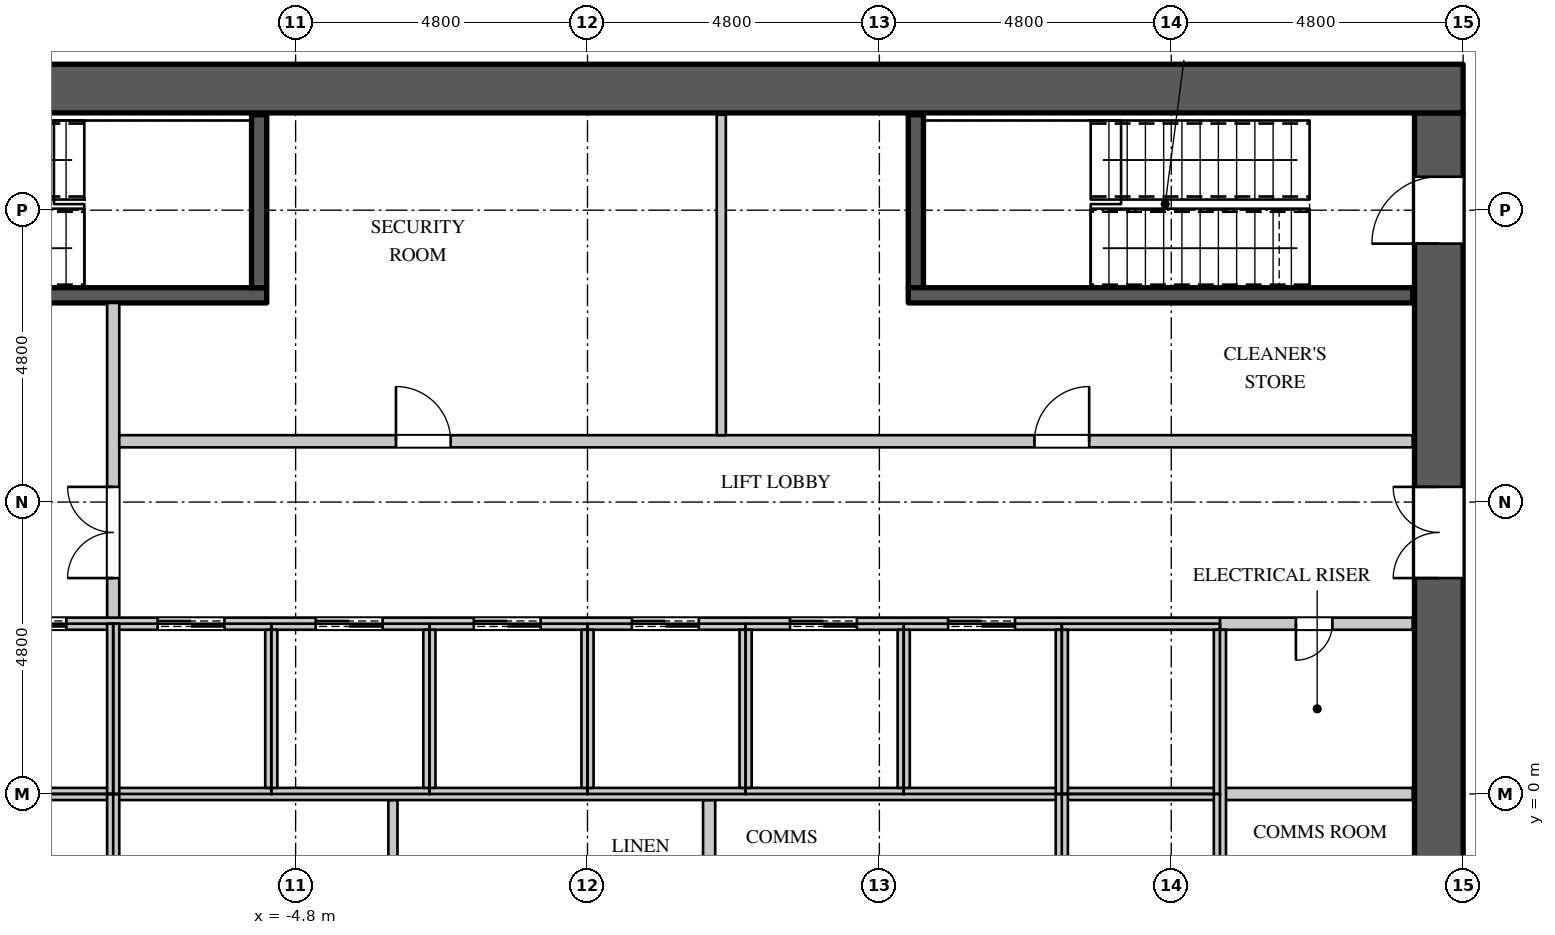
"""IFC4 building model, lengths in metres.
Left out: names, types, materials, properties, quantities, classifications, styles, units other than length and angle.
Written with IfcOpenShell. Run it as: python <this file> out.ifc"""

import sys

from ifc_helpers import new_model, si_unit, direction, frame, frame_2d, origin, place, context, subcontext, project, spatial, rectangle, extrude, element, fill, save


model = new_model("IFC4")
c1 = context("Model", 3, precision=1e-05, world=origin(), true_north=direction((0.0, 1.0)))
c2 = subcontext(c1, "Body", "Model", "MODEL_VIEW")
j1 = project(units=[si_unit("LENGTHUNIT", "METRE"), si_unit("PLANEANGLEUNIT", "RADIAN")], contexts=[c1])
p1 = place(None, origin())
s1 = spatial("IfcSite", under=j1, at=p1, CompositionType="ELEMENT")
p2 = place(p1, origin())
s2 = spatial("IfcBuilding", under=s1, at=p2, CompositionType="ELEMENT")
p3 = place(p2, frame((0.0, 0.0, 131.7)))
s3 = spatial("IfcBuildingStorey", under=s2, at=p3, CompositionType="ELEMENT", Elevation=131.7)
p4 = place(p3, frame((-14.4, 11.6, 0.0), z_axis=(0.0, 0.0, 1.0), x_axis=(1.0, 0.0, 0.0)))
e1 = element("IfcWall", 1, at=p4, inside=s3, PredefinedType="SHEAR", context=c2, shape_type="SweptSolid", body=[
    extrude(rectangle(XDim=28.8, YDim=0.8, at=frame_2d((14.4, 0.0))), origin(), (0.0, 0.0, 1.0), 4.2),
])
p5 = place(p3, frame((14.0, -11.2, 0.0), z_axis=(0.0, 0.0, 1.0), x_axis=(0.0, 1.0, 0.0)))
e2 = element("IfcWall", 2, at=p5, inside=s3, PredefinedType="SHEAR", context=c2, shape_type="SweptSolid", body=[
    extrude(rectangle(XDim=22.4, YDim=0.8, at=frame_2d((11.2, 0.0))), origin(), (0.0, 0.0, 1.0), 4.2),
])
p6 = place(p5, frame((20.25, 0.0, 0.0)))
e3 = element("IfcOpeningElement", 3, at=p6, cuts=e2, PredefinedType="OPENING", context=c2, shape_type="SweptSolid", body=[
    extrude(rectangle(XDim=1.1, YDim=2.2, at=frame_2d((0.55, 1.1))), frame((0.0, 0.41, 0.0), z_axis=(0.0, -1.0, 0.0), x_axis=(1.0, 0.0, 0.0)), (0.0, 0.0, 1.0), 0.82),
])
p7 = place(p5, frame((1.05, 0.0, 0.0)))
e4 = element("IfcOpeningElement", 4, at=p7, cuts=e2, PredefinedType="OPENING", context=c2, shape_type="SweptSolid", body=[
    extrude(rectangle(XDim=1.1, YDim=2.2, at=frame_2d((0.55, 1.1))), frame((0.0, 0.41, 0.0), z_axis=(0.0, -1.0, 0.0), x_axis=(1.0, 0.0, 0.0)), (0.0, 0.0, 1.0), 0.82),
])
p8 = place(p5, frame((14.75, 0.0, 0.0)))
e5 = element("IfcOpeningElement", 5, at=p8, cuts=e2, PredefinedType="OPENING", context=c2, shape_type="SweptSolid", body=[
    extrude(rectangle(XDim=1.5, YDim=2.4, at=frame_2d((0.75, 1.2))), frame((0.0, 0.41, 0.0), z_axis=(0.0, -1.0, 0.0), x_axis=(1.0, 0.0, 0.0)), (0.0, 0.0, 1.0), 0.82),
])
p9 = place(p5, frame((6.15, 0.0, 0.0)))
e6 = element("IfcOpeningElement", 6, at=p9, cuts=e2, PredefinedType="OPENING", context=c2, shape_type="SweptSolid", body=[
    extrude(rectangle(XDim=1.5, YDim=2.4, at=frame_2d((0.75, 1.2))), frame((0.0, 0.41, 0.0), z_axis=(0.0, -1.0, 0.0), x_axis=(1.0, 0.0, 0.0)), (0.0, 0.0, 1.0), 0.82),
])
p10 = place(p3, frame((-7.8, 2.8, 0.0), z_axis=(0.0, 0.0, 1.0), x_axis=(0.0, 1.0, 0.0)))
e7 = element("IfcWall", 7, at=p10, inside=s3, PredefinedType="PARTITIONING", context=c2, shape_type="SweptSolid", body=[
    extrude(rectangle(XDim=5.275, YDim=0.2, at=frame_2d((2.637, 0.0))), origin(), (0.0, 0.0, 1.0), 3.95),
])
p11 = place(p10, frame((0.75, 0.0, 0.0)))
e8 = element("IfcOpeningElement", 8, at=p11, cuts=e7, PredefinedType="OPENING", context=c2, shape_type="SweptSolid", body=[
    extrude(rectangle(XDim=1.5, YDim=2.4, at=frame_2d((0.75, 1.2))), frame((0.0, 0.11, 0.0), z_axis=(0.0, -1.0, 0.0), x_axis=(1.0, 0.0, 0.0)), (0.0, 0.0, 1.0), 0.22),
])
p12 = place(p3, frame((-7.7, 5.8, 0.0), z_axis=(0.0, 0.0, 1.0), x_axis=(1.0, 0.0, 0.0)))
e9 = element("IfcWall", 9, at=p12, inside=s3, PredefinedType="PARTITIONING", context=c2, shape_type="SweptSolid", body=[
    extrude(rectangle(XDim=21.27, YDim=0.2, at=frame_2d((10.635, 0.0))), origin(), (0.0, 0.0, 1.0), 3.95),
])
p13 = place(p12, frame((4.55, 0.0, 0.0)))
e10 = element("IfcOpeningElement", 10, at=p13, cuts=e9, PredefinedType="OPENING", context=c2, shape_type="SweptSolid", body=[
    extrude(rectangle(XDim=0.9, YDim=2.2, at=frame_2d((0.45, 1.1))), frame((0.0, 0.11, 0.0), z_axis=(0.0, -1.0, 0.0), x_axis=(1.0, 0.0, 0.0)), (0.0, 0.0, 1.0), 0.22),
])
p14 = place(p12, frame((15.05, 0.0, 0.0)))
e11 = element("IfcOpeningElement", 11, at=p14, cuts=e9, PredefinedType="OPENING", context=c2, shape_type="SweptSolid", body=[
    extrude(rectangle(XDim=0.9, YDim=2.2, at=frame_2d((0.45, 1.1))), frame((0.0, 0.11, 0.0), z_axis=(0.0, -1.0, 0.0), x_axis=(1.0, 0.0, 0.0)), (0.0, 0.0, 1.0), 0.22),
])
p15 = place(p3, frame((-3.2, -2.7, 0.0), z_axis=(0.0, 0.0, 1.0), x_axis=(0.0, 1.0, 0.0)))
e12 = element("IfcWall", 12, at=p15, inside=s3, PredefinedType="PARTITIONING", context=c2, shape_type="SweptSolid", body=[
    extrude(rectangle(XDim=2.6, YDim=0.15, at=frame_2d((1.3, 0.0))), origin(), (0.0, 0.0, 1.0), 3.95),
])
p16 = place(p3, frame((2.2, 5.9, 0.0), z_axis=(0.0, 0.0, 1.0), x_axis=(0.0, 1.0, 0.0)))
e13 = element("IfcWall", 13, at=p16, inside=s3, PredefinedType="PARTITIONING", context=c2, shape_type="SweptSolid", body=[
    extrude(rectangle(XDim=5.27, YDim=0.15, at=frame_2d((2.635, 0.0))), origin(), (0.0, 0.0, 1.0), 3.95),
])
p17 = place(p3, frame((2.0, -2.7, 0.0), z_axis=(0.0, 0.0, 1.0), x_axis=(0.0, 1.0, 0.0)))
e14 = element("IfcWall", 14, at=p17, inside=s3, PredefinedType="PARTITIONING", context=c2, shape_type="SweptSolid", body=[
    extrude(rectangle(XDim=2.6, YDim=0.2, at=frame_2d((1.3, 0.0))), origin(), (0.0, 0.0, 1.0), 3.95),
])
p18 = place(p3, frame((10.4, 2.8, 0.0), z_axis=(0.0, 0.0, 1.0), x_axis=(1.0, 0.0, 0.0)))
e15 = element("IfcWall", 15, at=p18, inside=s3, PredefinedType="PARTITIONING", context=c2, shape_type="SweptSolid", body=[
    extrude(rectangle(XDim=3.17, YDim=0.2, at=frame_2d((1.585, 0.0))), origin(), (0.0, 0.0, 1.0), 3.95),
])
p19 = place(p18, frame((1.25, 0.0, 0.0)))
e16 = element("IfcOpeningElement", 16, at=p19, cuts=e15, PredefinedType="OPENING", context=c2, shape_type="SweptSolid", body=[
    extrude(rectangle(XDim=0.6, YDim=2.0, at=frame_2d((0.3, 1.0))), frame((0.0, 0.11, 0.0), z_axis=(0.0, -1.0, 0.0), x_axis=(1.0, 0.0, 0.0)), (0.0, 0.0, 1.0), 0.22),
])
p20 = place(p3, frame((10.4, 0.0, 0.0), z_axis=(0.0, 0.0, 1.0), x_axis=(1.0, 0.0, 0.0)))
e17 = element("IfcWall", 17, at=p20, inside=s3, PredefinedType="PARTITIONING", context=c2, shape_type="SweptSolid", body=[
    extrude(rectangle(XDim=3.17, YDim=0.2, at=frame_2d((1.585, 0.0))), origin(), (0.0, 0.0, 1.0), 3.95),
])
p21 = place(p3, frame((-13.57, 0.0, 0.0), z_axis=(0.0, 0.0, 1.0), x_axis=(1.0, 0.0, 0.0)))
e18 = element("IfcWall", 18, at=p21, inside=s3, PredefinedType="PARTITIONING", context=c2, shape_type="SweptSolid", body=[
    extrude(rectangle(XDim=23.97, YDim=0.2, at=frame_2d((11.985, 0.0))), origin(), (0.0, 0.0, 1.0), 3.95),
])
p22 = place(p3, frame((-13.57, 2.8, 0.0), z_axis=(0.0, 0.0, 1.0), x_axis=(1.0, 0.0, 0.0)))
e19 = element("IfcWall", 19, at=p22, inside=s3, PredefinedType="PARTITIONING", context=c2, shape_type="SweptSolid", body=[
    extrude(rectangle(XDim=23.97, YDim=0.2, at=frame_2d((11.985, 0.0))), origin(), (0.0, 0.0, 1.0), 3.95),
])
p23 = place(p22, frame((1.0, 0.0, 0.0)))
e20 = element("IfcOpeningElement", 20, at=p23, cuts=e19, PredefinedType="OPENING", context=c2, shape_type="SweptSolid", body=[
    extrude(rectangle(XDim=1.1, YDim=2.2, at=frame_2d((0.55, 1.1))), frame((0.0, 0.11, 0.0), z_axis=(0.0, -1.0, 0.0), x_axis=(1.0, 0.0, 0.0)), (0.0, 0.0, 1.0), 0.22),
])
p24 = place(p22, frame((3.9, 0.0, 0.0)))
e21 = element("IfcOpeningElement", 21, at=p24, cuts=e19, PredefinedType="OPENING", context=c2, shape_type="SweptSolid", body=[
    extrude(rectangle(XDim=1.1, YDim=2.2, at=frame_2d((0.55, 1.1))), frame((0.0, 0.11, 0.0), z_axis=(0.0, -1.0, 0.0), x_axis=(1.0, 0.0, 0.0)), (0.0, 0.0, 1.0), 0.22),
])
p25 = place(p22, frame((6.5, 0.0, 0.0)))
e22 = element("IfcOpeningElement", 22, at=p25, cuts=e19, PredefinedType="OPENING", context=c2, shape_type="SweptSolid", body=[
    extrude(rectangle(XDim=1.1, YDim=2.2, at=frame_2d((0.55, 1.1))), frame((0.0, 0.11, 0.0), z_axis=(0.0, -1.0, 0.0), x_axis=(1.0, 0.0, 0.0)), (0.0, 0.0, 1.0), 0.22),
])
p26 = place(p22, frame((9.1, 0.0, 0.0)))
e23 = element("IfcOpeningElement", 23, at=p26, cuts=e19, PredefinedType="OPENING", context=c2, shape_type="SweptSolid", body=[
    extrude(rectangle(XDim=1.1, YDim=2.2, at=frame_2d((0.55, 1.1))), frame((0.0, 0.11, 0.0), z_axis=(0.0, -1.0, 0.0), x_axis=(1.0, 0.0, 0.0)), (0.0, 0.0, 1.0), 0.22),
])
p27 = place(p22, frame((11.7, 0.0, 0.0)))
e24 = element("IfcOpeningElement", 24, at=p27, cuts=e19, PredefinedType="OPENING", context=c2, shape_type="SweptSolid", body=[
    extrude(rectangle(XDim=1.1, YDim=2.2, at=frame_2d((0.55, 1.1))), frame((0.0, 0.11, 0.0), z_axis=(0.0, -1.0, 0.0), x_axis=(1.0, 0.0, 0.0)), (0.0, 0.0, 1.0), 0.22),
])
p28 = place(p22, frame((14.3, 0.0, 0.0)))
e25 = element("IfcOpeningElement", 25, at=p28, cuts=e19, PredefinedType="OPENING", context=c2, shape_type="SweptSolid", body=[
    extrude(rectangle(XDim=1.1, YDim=2.2, at=frame_2d((0.55, 1.1))), frame((0.0, 0.11, 0.0), z_axis=(0.0, -1.0, 0.0), x_axis=(1.0, 0.0, 0.0)), (0.0, 0.0, 1.0), 0.22),
])
p29 = place(p22, frame((16.9, 0.0, 0.0)))
e26 = element("IfcOpeningElement", 26, at=p29, cuts=e19, PredefinedType="OPENING", context=c2, shape_type="SweptSolid", body=[
    extrude(rectangle(XDim=1.1, YDim=2.2, at=frame_2d((0.55, 1.1))), frame((0.0, 0.11, 0.0), z_axis=(0.0, -1.0, 0.0), x_axis=(1.0, 0.0, 0.0)), (0.0, 0.0, 1.0), 0.22),
])
p30 = place(p22, frame((19.5, 0.0, 0.0)))
e27 = element("IfcOpeningElement", 27, at=p30, cuts=e19, PredefinedType="OPENING", context=c2, shape_type="SweptSolid", body=[
    extrude(rectangle(XDim=1.1, YDim=2.2, at=frame_2d((0.55, 1.1))), frame((0.0, 0.11, 0.0), z_axis=(0.0, -1.0, 0.0), x_axis=(1.0, 0.0, 0.0)), (0.0, 0.0, 1.0), 0.22),
])
for number, where, z_axis, x_axis in (
    (28, (-7.8, -2.8, 0.0), (0.0, 0.0, 1.0), (0.0, 1.0, 0.0)),
    (29, (-7.8, 0.0, 0.0), (0.0, 0.0, 1.0), (0.0, 1.0, 0.0)),
):
    element("IfcWall", number, at=place(p3, frame(where, z_axis=z_axis, x_axis=x_axis)), inside=s3, PredefinedType="PARTITIONING", context=c2, shape_type="SweptSolid", body=[
        extrude(rectangle(XDim=2.8, YDim=0.2, at=frame_2d((1.4, 0.0))), origin(), (0.0, 0.0, 1.0), 3.95),
    ])
for number, where, z_axis, x_axis in (
    (30, (-5.2, 0.1, 0.0), (0.0, 0.0, 1.0), (0.0, 1.0, 0.0)),
    (31, (-2.6, 0.1, 0.0), (0.0, 0.0, 1.0), (0.0, 1.0, 0.0)),
    (32, (0.0, 0.1, 0.0), (0.0, 0.0, 1.0), (0.0, 1.0, 0.0)),
    (33, (2.6, 0.1, 0.0), (0.0, 0.0, 1.0), (0.0, 1.0, 0.0)),
    (34, (5.2, 0.1, 0.0), (0.0, 0.0, 1.0), (0.0, 1.0, 0.0)),
):
    element("IfcWall", number, at=place(p3, frame(where, z_axis=z_axis, x_axis=x_axis)), inside=s3, PredefinedType="PARTITIONING", context=c2, shape_type="SweptSolid", body=[
        extrude(rectangle(XDim=2.6, YDim=0.2, at=frame_2d((1.3, 0.0))), origin(), (0.0, 0.0, 1.0), 3.95),
    ])
for number, where, z_axis, x_axis in (
    (35, (7.8, -2.7, 0.0), (0.0, 0.0, 1.0), (0.0, 1.0, 0.0)),
    (36, (7.8, 0.0, 0.0), (0.0, 0.0, 1.0), (0.0, 1.0, 0.0)),
):
    element("IfcWall", number, at=place(p3, frame(where, z_axis=z_axis, x_axis=x_axis)), inside=s3, PredefinedType="PARTITIONING", context=c2, shape_type="SweptSolid", body=[
        extrude(rectangle(XDim=2.7, YDim=0.2, at=frame_2d((1.35, 0.0))), origin(), (0.0, 0.0, 1.0), 3.95),
    ])
p31 = place(p3, frame((10.4, -2.7, 0.0), z_axis=(0.0, 0.0, 1.0), x_axis=(0.0, 1.0, 0.0)))
e37 = element("IfcWall", 37, at=p31, inside=s3, PredefinedType="PARTITIONING", context=c2, shape_type="SweptSolid", body=[
    extrude(rectangle(XDim=5.4, YDim=0.2, at=frame_2d((2.7, 0.0))), origin(), (0.0, 0.0, 1.0), 3.95),
])
p32 = place(p3, frame((-13.57, 8.2, 0.0), z_axis=(0.0, 0.0, 1.0), x_axis=(1.0, 0.0, 0.0)))
e38 = element("IfcWall", 38, at=p32, inside=s3, PredefinedType="SHEAR", context=c2, shape_type="SweptSolid", body=[
    extrude(rectangle(XDim=8.295, YDim=0.25, at=frame_2d((4.147, 0.0))), origin(), (0.0, 0.0, 1.0), 3.95),
])
p33 = place(p32, frame((0.15, 0.0, 0.0)))
e39 = element("IfcOpeningElement", 39, at=p33, cuts=e38, PredefinedType="OPENING", context=c2, shape_type="SweptSolid", body=[
    extrude(rectangle(XDim=1.1, YDim=2.2, at=frame_2d((0.55, 1.1))), frame((0.0, 0.135, 0.0), z_axis=(0.0, -1.0, 0.0), x_axis=(1.0, 0.0, 0.0)), (0.0, 0.0, 1.0), 0.27),
])
for number, where, z_axis, x_axis in (
    (40, (-5.4, 8.325, 0.0), (0.0, 0.0, 1.0), (0.0, 1.0, 0.0)),
    (41, (5.4, 8.325, 0.0), (0.0, 0.0, 1.0), (0.0, 1.0, 0.0)),
):
    element("IfcWall", number, at=place(p3, frame(where, z_axis=z_axis, x_axis=x_axis)), inside=s3, PredefinedType="SHEAR", context=c2, shape_type="SweptSolid", body=[
        extrude(rectangle(XDim=2.845, YDim=0.25, at=frame_2d((1.422, 0.0))), origin(), (0.0, 0.0, 1.0), 3.95),
    ])
p34 = place(p3, frame((5.275, 8.2, 0.0), z_axis=(0.0, 0.0, 1.0), x_axis=(1.0, 0.0, 0.0)))
e42 = element("IfcWall", 42, at=p34, inside=s3, PredefinedType="SHEAR", context=c2, shape_type="SweptSolid", body=[
    extrude(rectangle(XDim=8.295, YDim=0.25, at=frame_2d((4.147, 0.0))), origin(), (0.0, 0.0, 1.0), 3.95),
])
p35 = place(p19, origin())
e43 = element("IfcDoor", 43, at=p35, inside=s3, OperationType="SINGLE_SWING_RIGHT", PredefinedType="DOOR", context=c2, shape_type="SweptSolid", body=[
    extrude(rectangle(XDim=0.6, YDim=2.0, at=frame_2d((0.3, 1.0))), frame((0.0, 0.025, 0.0), z_axis=(0.0, -1.0, 0.0), x_axis=(1.0, 0.0, 0.0)), (0.0, 0.0, 1.0), 0.05),
])
fill(e16, e43)
p36 = place(p13, origin())
e44 = element("IfcDoor", 44, at=p36, inside=s3, OperationType="SINGLE_SWING_LEFT", PredefinedType="DOOR", context=c2, shape_type="SweptSolid", body=[
    extrude(rectangle(XDim=0.9, YDim=2.2, at=frame_2d((0.45, 1.1))), frame((0.0, 0.025, 0.0), z_axis=(0.0, -1.0, 0.0), x_axis=(1.0, 0.0, 0.0)), (0.0, 0.0, 1.0), 0.05),
])
fill(e10, e44)
p37 = place(p14, origin())
e45 = element("IfcDoor", 45, at=p37, inside=s3, OperationType="SINGLE_SWING_RIGHT", PredefinedType="DOOR", context=c2, shape_type="SweptSolid", body=[
    extrude(rectangle(XDim=0.9, YDim=2.2, at=frame_2d((0.45, 1.1))), frame((0.0, 0.025, 0.0), z_axis=(0.0, -1.0, 0.0), x_axis=(1.0, 0.0, 0.0)), (0.0, 0.0, 1.0), 0.05),
])
fill(e11, e45)
p38 = place(p24, origin())
e46 = element("IfcDoor", 46, at=p38, inside=s3, OperationType="DOUBLE_DOOR_SLIDING", PredefinedType="DOOR", context=c2, shape_type="SweptSolid", body=[
    extrude(rectangle(XDim=1.1, YDim=2.2, at=frame_2d((0.55, 1.1))), frame((0.0, 0.025, 0.0), z_axis=(0.0, -1.0, 0.0), x_axis=(1.0, 0.0, 0.0)), (0.0, 0.0, 1.0), 0.05),
])
fill(e21, e46)
p39 = place(p25, origin())
e47 = element("IfcDoor", 47, at=p39, inside=s3, OperationType="DOUBLE_DOOR_SLIDING", PredefinedType="DOOR", context=c2, shape_type="SweptSolid", body=[
    extrude(rectangle(XDim=1.1, YDim=2.2, at=frame_2d((0.55, 1.1))), frame((0.0, 0.025, 0.0), z_axis=(0.0, -1.0, 0.0), x_axis=(1.0, 0.0, 0.0)), (0.0, 0.0, 1.0), 0.05),
])
fill(e22, e47)
p40 = place(p26, origin())
e48 = element("IfcDoor", 48, at=p40, inside=s3, OperationType="DOUBLE_DOOR_SLIDING", PredefinedType="DOOR", context=c2, shape_type="SweptSolid", body=[
    extrude(rectangle(XDim=1.1, YDim=2.2, at=frame_2d((0.55, 1.1))), frame((0.0, 0.025, 0.0), z_axis=(0.0, -1.0, 0.0), x_axis=(1.0, 0.0, 0.0)), (0.0, 0.0, 1.0), 0.05),
])
fill(e23, e48)
p41 = place(p27, origin())
e49 = element("IfcDoor", 49, at=p41, inside=s3, OperationType="DOUBLE_DOOR_SLIDING", PredefinedType="DOOR", context=c2, shape_type="SweptSolid", body=[
    extrude(rectangle(XDim=1.1, YDim=2.2, at=frame_2d((0.55, 1.1))), frame((0.0, 0.025, 0.0), z_axis=(0.0, -1.0, 0.0), x_axis=(1.0, 0.0, 0.0)), (0.0, 0.0, 1.0), 0.05),
])
fill(e24, e49)
p42 = place(p28, origin())
e50 = element("IfcDoor", 50, at=p42, inside=s3, OperationType="DOUBLE_DOOR_SLIDING", PredefinedType="DOOR", context=c2, shape_type="SweptSolid", body=[
    extrude(rectangle(XDim=1.1, YDim=2.2, at=frame_2d((0.55, 1.1))), frame((0.0, 0.025, 0.0), z_axis=(0.0, -1.0, 0.0), x_axis=(1.0, 0.0, 0.0)), (0.0, 0.0, 1.0), 0.05),
])
fill(e25, e50)
p43 = place(p29, origin())
e51 = element("IfcDoor", 51, at=p43, inside=s3, OperationType="DOUBLE_DOOR_SLIDING", PredefinedType="DOOR", context=c2, shape_type="SweptSolid", body=[
    extrude(rectangle(XDim=1.1, YDim=2.2, at=frame_2d((0.55, 1.1))), frame((0.0, 0.025, 0.0), z_axis=(0.0, -1.0, 0.0), x_axis=(1.0, 0.0, 0.0)), (0.0, 0.0, 1.0), 0.05),
])
fill(e26, e51)
p44 = place(p30, origin())
e52 = element("IfcDoor", 52, at=p44, inside=s3, OperationType="DOUBLE_DOOR_SLIDING", PredefinedType="DOOR", context=c2, shape_type="SweptSolid", body=[
    extrude(rectangle(XDim=1.1, YDim=2.2, at=frame_2d((0.55, 1.1))), frame((0.0, 0.025, 0.0), z_axis=(0.0, -1.0, 0.0), x_axis=(1.0, 0.0, 0.0)), (0.0, 0.0, 1.0), 0.05),
])
fill(e27, e52)
p45 = place(p11, origin())
e53 = element("IfcDoor", 53, at=p45, inside=s3, OperationType="DOUBLE_DOOR_SINGLE_SWING", PredefinedType="DOOR", context=c2, shape_type="SweptSolid", body=[
    extrude(rectangle(XDim=1.5, YDim=2.4, at=frame_2d((0.75, 1.2))), frame((0.0, 0.025, 0.0), z_axis=(0.0, -1.0, 0.0), x_axis=(1.0, 0.0, 0.0)), (0.0, 0.0, 1.0), 0.05),
])
fill(e8, e53)
p46 = place(p6, origin())
e54 = element("IfcDoor", 54, at=p46, inside=s3, OperationType="SINGLE_SWING_LEFT", PredefinedType="DOOR", context=c2, shape_type="SweptSolid", body=[
    extrude(rectangle(XDim=1.1, YDim=2.2, at=frame_2d((0.55, 1.1))), frame((0.0, 0.395, 0.0), z_axis=(0.0, -1.0, 0.0), x_axis=(1.0, 0.0, 0.0)), (0.0, 0.0, 1.0), 0.05),
])
fill(e3, e54)
p47 = place(p8, origin())
e55 = element("IfcDoor", 55, at=p47, inside=s3, OperationType="DOUBLE_DOOR_SINGLE_SWING", PredefinedType="DOOR", context=c2, shape_type="SweptSolid", body=[
    extrude(rectangle(XDim=1.5, YDim=2.4, at=frame_2d((0.75, 1.2))), frame((0.0, 0.395, 0.0), z_axis=(0.0, -1.0, 0.0), x_axis=(1.0, 0.0, 0.0)), (0.0, 0.0, 1.0), 0.05),
])
fill(e5, e55)
save(model, sys.argv[1])
